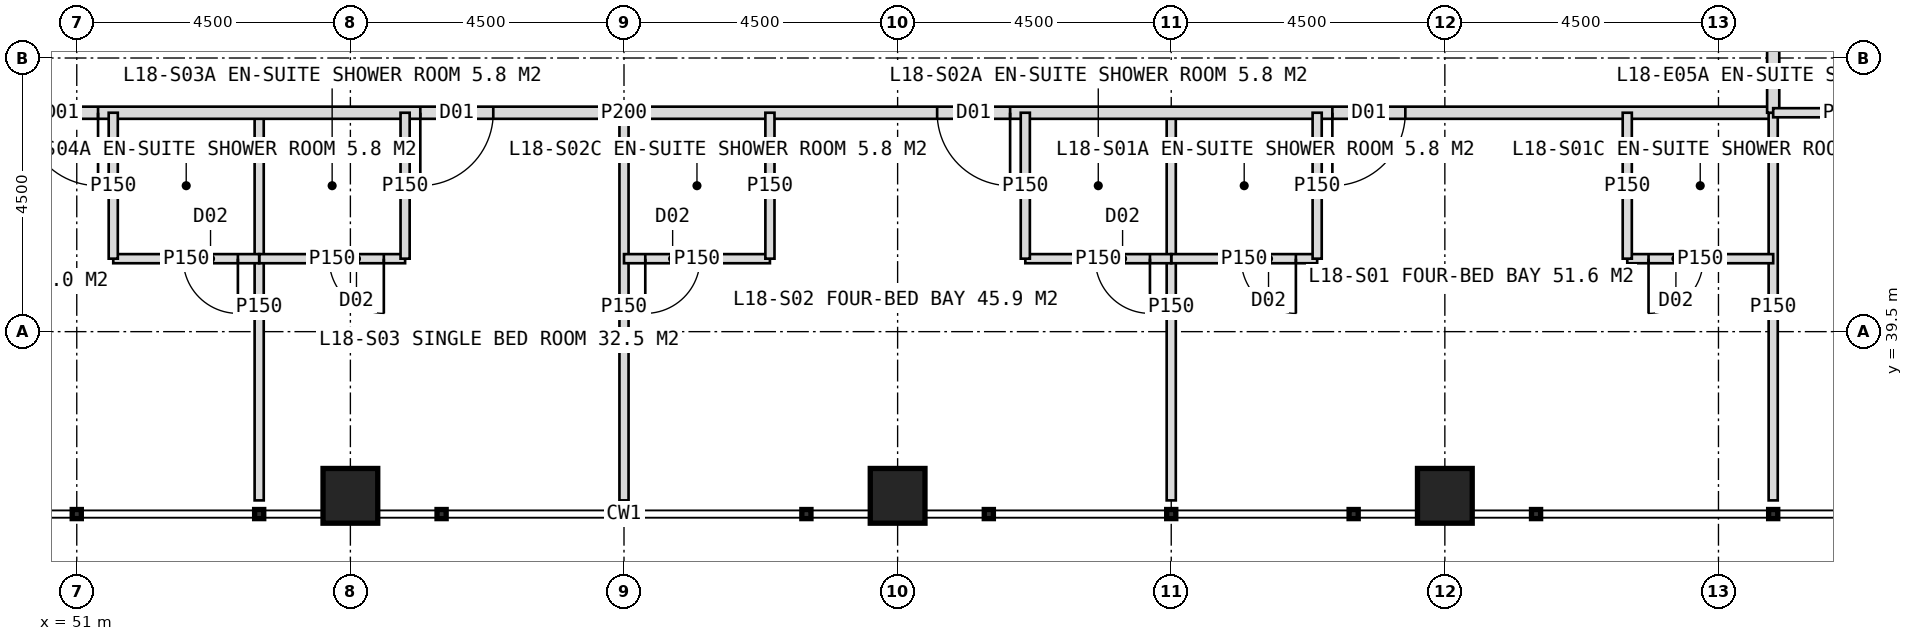
"""IFC4 building model, lengths in metres.
Left out: names, types, materials, properties, quantities, classifications, styles, units other than length and angle.
Written with IfcOpenShell. Run it as: python <this file> out.ifc"""

import sys

from ifc_helpers import new_model, si_unit, direction, frame, frame_2d, origin, origin_2d, place, context, subcontext, project, spatial, rectangle, hollow_rectangle, extrude, element, fill, save


model = new_model("IFC4")
c1 = context("Model", 3, precision=1e-05, world=origin(), true_north=direction((0.0, 1.0)))
c2 = subcontext(c1, "Body", "Model", "MODEL_VIEW")
j1 = project(units=[si_unit("LENGTHUNIT", "METRE"), si_unit("PLANEANGLEUNIT", "RADIAN")], contexts=[c1])
p1 = place(None, origin())
s1 = spatial("IfcSite", under=j1, at=p1, CompositionType="ELEMENT")
p2 = place(p1, origin())
s2 = spatial("IfcBuilding", under=s1, at=p2, CompositionType="ELEMENT")
p3 = place(p2, frame((0.0, 0.0, 79.0)))
s3 = spatial("IfcBuildingStorey", under=s2, at=p3, CompositionType="ELEMENT", Elevation=79.0)
for number, where, z_axis, x_axis in (
    (1, (55.5, 36.8, 0.0), (0.0, 0.0, 1.0), (1.0, 0.0, 0.0)),
    (2, (64.5, 36.8, 0.0), (0.0, 0.0, 1.0), (1.0, 0.0, 0.0)),
    (3, (73.5, 36.8, 0.0), (0.0, 0.0, 1.0), (1.0, 0.0, 0.0)),
):
    element("IfcColumn", number, at=place(p3, frame(where, z_axis=z_axis, x_axis=x_axis)), inside=s3, PredefinedType="COLUMN", context=c2, shape_type="SweptSolid", body=[
        extrude(hollow_rectangle(XDim=0.9, YDim=0.9, WallThickness=0.08, at=origin_2d()), origin(), (0.0, 0.0, 1.0), 4.0),
    ])
p4 = place(p3, frame((69.0, 43.1, 0.0), z_axis=(0.0, 0.0, 1.0), x_axis=(0.0, -1.0, 0.0)))
e4 = element("IfcWall", 4, at=p4, inside=s3, PredefinedType="PARTITIONING", context=c2, shape_type="SweptSolid", body=[
    extrude(rectangle(XDim=6.375, YDim=0.15, at=frame_2d((3.188, 0.0))), origin(), (0.0, 0.0, 1.0), 3.75),
])
p5 = place(p3, frame((60.0, 43.1, 0.0), z_axis=(0.0, 0.0, 1.0), x_axis=(0.0, -1.0, 0.0)))
e5 = element("IfcWall", 5, at=p5, inside=s3, PredefinedType="PARTITIONING", context=c2, shape_type="SweptSolid", body=[
    extrude(rectangle(XDim=6.375, YDim=0.15, at=frame_2d((3.188, 0.0))), origin(), (0.0, 0.0, 1.0), 2.75),
])
p6 = place(p3, frame((54.0, 43.1, 0.0), z_axis=(0.0, 0.0, 1.0), x_axis=(0.0, -1.0, 0.0)))
e6 = element("IfcWall", 6, at=p6, inside=s3, PredefinedType="PARTITIONING", context=c2, shape_type="SweptSolid", body=[
    extrude(rectangle(XDim=6.375, YDim=0.15, at=frame_2d((3.188, 0.0))), origin(), (0.0, 0.0, 1.0), 3.75),
])
p7 = place(p3, frame((78.9, 43.1, 0.0), z_axis=(0.0, 0.0, 1.0), x_axis=(-1.0, 0.0, 0.0)))
e7 = element("IfcWall", 7, at=p7, inside=s3, PredefinedType="PARTITIONING", context=c2, shape_type="SweptSolid", body=[
    extrude(rectangle(XDim=37.8, YDim=0.2, at=frame_2d((18.9, 0.0))), origin(), (0.0, 0.0, 1.0), 3.75),
])
p8 = place(p7, frame((6.05, 0.0, 0.0)))
e8 = element("IfcOpeningElement", 8, at=p8, cuts=e7, PredefinedType="OPENING", context=c2, shape_type="SweptSolid", body=[
    extrude(rectangle(XDim=1.2, YDim=2.2, at=frame_2d((0.6, 1.1))), frame((0.0, 0.11, 0.0), z_axis=(0.0, -1.0, 0.0), x_axis=(1.0, 0.0, 0.0)), (0.0, 0.0, 1.0), 0.22),
])
p9 = place(p7, frame((12.55, 0.0, 0.0)))
e9 = element("IfcOpeningElement", 9, at=p9, cuts=e7, PredefinedType="OPENING", context=c2, shape_type="SweptSolid", body=[
    extrude(rectangle(XDim=1.2, YDim=2.2, at=frame_2d((0.6, 1.1))), frame((0.0, 0.11, 0.0), z_axis=(0.0, -1.0, 0.0), x_axis=(1.0, 0.0, 0.0)), (0.0, 0.0, 1.0), 0.22),
])
p10 = place(p7, frame((21.05, 0.0, 0.0)))
e10 = element("IfcOpeningElement", 10, at=p10, cuts=e7, PredefinedType="OPENING", context=c2, shape_type="SweptSolid", body=[
    extrude(rectangle(XDim=1.2, YDim=2.2, at=frame_2d((0.6, 1.1))), frame((0.0, 0.11, 0.0), z_axis=(0.0, -1.0, 0.0), x_axis=(1.0, 0.0, 0.0)), (0.0, 0.0, 1.0), 0.22),
])
p11 = place(p7, frame((27.55, 0.0, 0.0)))
e11 = element("IfcOpeningElement", 11, at=p11, cuts=e7, PredefinedType="OPENING", context=c2, shape_type="SweptSolid", body=[
    extrude(rectangle(XDim=1.2, YDim=2.2, at=frame_2d((0.6, 1.1))), frame((0.0, 0.11, 0.0), z_axis=(0.0, -1.0, 0.0), x_axis=(1.0, 0.0, 0.0)), (0.0, 0.0, 1.0), 0.22),
])
p12 = place(p3, frame((78.9, 43.1, 0.0), z_axis=(0.0, 0.0, 1.0), x_axis=(0.0, -1.0, 0.0)))
e12 = element("IfcWall", 12, at=p12, inside=s3, PredefinedType="PARTITIONING", context=c2, shape_type="SweptSolid", body=[
    extrude(rectangle(XDim=6.375, YDim=0.15, at=frame_2d((3.188, 0.0))), origin(), (0.0, 0.0, 1.0), 3.75),
])
p13 = place(p3, frame((71.4, 40.7, 0.0), z_axis=(0.0, 0.0, 1.0), x_axis=(-1.0, 0.0, 0.0)))
e13 = element("IfcWall", 13, at=p13, inside=s3, PredefinedType="PARTITIONING", context=c2, shape_type="SweptSolid", body=[
    extrude(rectangle(XDim=2.4, YDim=0.15, at=frame_2d((1.2, 0.0))), origin(), (0.0, 0.0, 1.0), 3.75),
])
p14 = place(p13, frame((0.35, 0.0, 0.0)))
e14 = element("IfcOpeningElement", 14, at=p14, cuts=e13, PredefinedType="OPENING", context=c2, shape_type="SweptSolid", body=[
    extrude(rectangle(XDim=0.9, YDim=2.1, at=frame_2d((0.45, 1.05))), frame((0.0, 0.085, 0.0), z_axis=(0.0, -1.0, 0.0), x_axis=(1.0, 0.0, 0.0)), (0.0, 0.0, 1.0), 0.17),
])
p15 = place(p3, frame((71.4, 43.1, 0.0), z_axis=(0.0, 0.0, 1.0), x_axis=(0.0, -1.0, 0.0)))
e15 = element("IfcWall", 15, at=p15, inside=s3, PredefinedType="PARTITIONING", context=c2, shape_type="SweptSolid", body=[
    extrude(rectangle(XDim=2.4, YDim=0.15, at=frame_2d((1.2, 0.0))), origin(), (0.0, 0.0, 1.0), 3.75),
])
p16 = place(p3, frame((78.9, 40.7, 0.0), z_axis=(0.0, 0.0, 1.0), x_axis=(-1.0, 0.0, 0.0)))
e16 = element("IfcWall", 16, at=p16, inside=s3, PredefinedType="PARTITIONING", context=c2, shape_type="SweptSolid", body=[
    extrude(rectangle(XDim=2.4, YDim=0.15, at=frame_2d((1.2, 0.0))), origin(), (0.0, 0.0, 1.0), 3.75),
])
p17 = place(p16, frame((1.15, 0.0, 0.0)))
e17 = element("IfcOpeningElement", 17, at=p17, cuts=e16, PredefinedType="OPENING", context=c2, shape_type="SweptSolid", body=[
    extrude(rectangle(XDim=0.9, YDim=2.1, at=frame_2d((0.45, 1.05))), frame((0.0, 0.085, 0.0), z_axis=(0.0, -1.0, 0.0), x_axis=(1.0, 0.0, 0.0)), (0.0, 0.0, 1.0), 0.17),
])
p18 = place(p3, frame((76.5, 43.1, 0.0), z_axis=(0.0, 0.0, 1.0), x_axis=(0.0, -1.0, 0.0)))
e18 = element("IfcWall", 18, at=p18, inside=s3, PredefinedType="PARTITIONING", context=c2, shape_type="SweptSolid", body=[
    extrude(rectangle(XDim=2.4, YDim=0.15, at=frame_2d((1.2, 0.0))), origin(), (0.0, 0.0, 1.0), 3.75),
])
p19 = place(p3, frame((69.0, 40.7, 0.0), z_axis=(0.0, 0.0, 1.0), x_axis=(-1.0, 0.0, 0.0)))
e19 = element("IfcWall", 19, at=p19, inside=s3, PredefinedType="PARTITIONING", context=c2, shape_type="SweptSolid", body=[
    extrude(rectangle(XDim=2.4, YDim=0.15, at=frame_2d((1.2, 0.0))), origin(), (0.0, 0.0, 1.0), 3.75),
])
p20 = place(p19, frame((0.35, 0.0, 0.0)))
e20 = element("IfcOpeningElement", 20, at=p20, cuts=e19, PredefinedType="OPENING", context=c2, shape_type="SweptSolid", body=[
    extrude(rectangle(XDim=0.9, YDim=2.1, at=frame_2d((0.45, 1.05))), frame((0.0, 0.085, 0.0), z_axis=(0.0, -1.0, 0.0), x_axis=(1.0, 0.0, 0.0)), (0.0, 0.0, 1.0), 0.17),
])
p21 = place(p3, frame((66.6, 43.1, 0.0), z_axis=(0.0, 0.0, 1.0), x_axis=(0.0, -1.0, 0.0)))
e21 = element("IfcWall", 21, at=p21, inside=s3, PredefinedType="PARTITIONING", context=c2, shape_type="SweptSolid", body=[
    extrude(rectangle(XDim=2.4, YDim=0.15, at=frame_2d((1.2, 0.0))), origin(), (0.0, 0.0, 1.0), 3.75),
])
p22 = place(p3, frame((62.4, 40.7, 0.0), z_axis=(0.0, 0.0, 1.0), x_axis=(-1.0, 0.0, 0.0)))
e22 = element("IfcWall", 22, at=p22, inside=s3, PredefinedType="PARTITIONING", context=c2, shape_type="SweptSolid", body=[
    extrude(rectangle(XDim=2.4, YDim=0.15, at=frame_2d((1.2, 0.0))), origin(), (0.0, 0.0, 1.0), 3.75),
])
p23 = place(p22, frame((1.15, 0.0, 0.0)))
e23 = element("IfcOpeningElement", 23, at=p23, cuts=e22, PredefinedType="OPENING", context=c2, shape_type="SweptSolid", body=[
    extrude(rectangle(XDim=0.9, YDim=2.1, at=frame_2d((0.45, 1.05))), frame((0.0, 0.085, 0.0), z_axis=(0.0, -1.0, 0.0), x_axis=(1.0, 0.0, 0.0)), (0.0, 0.0, 1.0), 0.17),
])
p24 = place(p3, frame((62.4, 43.1, 0.0), z_axis=(0.0, 0.0, 1.0), x_axis=(0.0, -1.0, 0.0)))
e24 = element("IfcWall", 24, at=p24, inside=s3, PredefinedType="PARTITIONING", context=c2, shape_type="SweptSolid", body=[
    extrude(rectangle(XDim=2.4, YDim=0.15, at=frame_2d((1.2, 0.0))), origin(), (0.0, 0.0, 1.0), 3.75),
])
p25 = place(p3, frame((56.4, 40.7, 0.0), z_axis=(0.0, 0.0, 1.0), x_axis=(-1.0, 0.0, 0.0)))
e25 = element("IfcWall", 25, at=p25, inside=s3, PredefinedType="PARTITIONING", context=c2, shape_type="SweptSolid", body=[
    extrude(rectangle(XDim=2.4, YDim=0.15, at=frame_2d((1.2, 0.0))), origin(), (0.0, 0.0, 1.0), 3.75),
])
p26 = place(p25, frame((0.35, 0.0, 0.0)))
e26 = element("IfcOpeningElement", 26, at=p26, cuts=e25, PredefinedType="OPENING", context=c2, shape_type="SweptSolid", body=[
    extrude(rectangle(XDim=0.9, YDim=2.1, at=frame_2d((0.45, 1.05))), frame((0.0, 0.085, 0.0), z_axis=(0.0, -1.0, 0.0), x_axis=(1.0, 0.0, 0.0)), (0.0, 0.0, 1.0), 0.17),
])
p27 = place(p3, frame((56.4, 43.1, 0.0), z_axis=(0.0, 0.0, 1.0), x_axis=(0.0, -1.0, 0.0)))
e27 = element("IfcWall", 27, at=p27, inside=s3, PredefinedType="PARTITIONING", context=c2, shape_type="SweptSolid", body=[
    extrude(rectangle(XDim=2.4, YDim=0.15, at=frame_2d((1.2, 0.0))), origin(), (0.0, 0.0, 1.0), 3.75),
])
p28 = place(p3, frame((54.0, 40.7, 0.0), z_axis=(0.0, 0.0, 1.0), x_axis=(-1.0, 0.0, 0.0)))
e28 = element("IfcWall", 28, at=p28, inside=s3, PredefinedType="PARTITIONING", context=c2, shape_type="SweptSolid", body=[
    extrude(rectangle(XDim=2.4, YDim=0.15, at=frame_2d((1.2, 0.0))), origin(), (0.0, 0.0, 1.0), 3.75),
])
p29 = place(p28, frame((0.35, 0.0, 0.0)))
e29 = element("IfcOpeningElement", 29, at=p29, cuts=e28, PredefinedType="OPENING", context=c2, shape_type="SweptSolid", body=[
    extrude(rectangle(XDim=0.9, YDim=2.1, at=frame_2d((0.45, 1.05))), frame((0.0, 0.085, 0.0), z_axis=(0.0, -1.0, 0.0), x_axis=(1.0, 0.0, 0.0)), (0.0, 0.0, 1.0), 0.17),
])
p30 = place(p3, frame((51.6, 43.1, 0.0), z_axis=(0.0, 0.0, 1.0), x_axis=(0.0, -1.0, 0.0)))
e30 = element("IfcWall", 30, at=p30, inside=s3, PredefinedType="PARTITIONING", context=c2, shape_type="SweptSolid", body=[
    extrude(rectangle(XDim=2.4, YDim=0.15, at=frame_2d((1.2, 0.0))), origin(), (0.0, 0.0, 1.0), 3.75),
])
p31 = place(p3, frame((78.9, 80.9, 0.0), z_axis=(0.0, 0.0, 1.0), x_axis=(0.0, -1.0, 0.0)))
e31 = element("IfcWall", 31, at=p31, inside=s3, PredefinedType="PARTITIONING", context=c2, shape_type="SweptSolid", body=[
    extrude(rectangle(XDim=37.8, YDim=0.2, at=frame_2d((18.9, 0.0))), origin(), (0.0, 0.0, 1.0), 3.75),
])
p32 = place(p31, frame((2.45, 0.0, 0.0)))
e32 = element("IfcOpeningElement", 32, at=p32, cuts=e31, PredefinedType="OPENING", context=c2, shape_type="SweptSolid", body=[
    extrude(rectangle(XDim=1.2, YDim=2.2, at=frame_2d((0.6, 1.1))), frame((0.0, 0.11, 0.0), z_axis=(0.0, -1.0, 0.0), x_axis=(1.0, 0.0, 0.0)), (0.0, 0.0, 1.0), 0.22),
])
p33 = place(p31, frame((9.55, 0.0, 0.0)))
e33 = element("IfcOpeningElement", 33, at=p33, cuts=e31, PredefinedType="OPENING", context=c2, shape_type="SweptSolid", body=[
    extrude(rectangle(XDim=1.2, YDim=2.2, at=frame_2d((0.6, 1.1))), frame((0.0, 0.11, 0.0), z_axis=(0.0, -1.0, 0.0), x_axis=(1.0, 0.0, 0.0)), (0.0, 0.0, 1.0), 0.22),
])
p34 = place(p31, frame((15.05, 0.0, 0.0)))
e34 = element("IfcOpeningElement", 34, at=p34, cuts=e31, PredefinedType="OPENING", context=c2, shape_type="SweptSolid", body=[
    extrude(rectangle(XDim=1.2, YDim=2.2, at=frame_2d((0.6, 1.1))), frame((0.0, 0.11, 0.0), z_axis=(0.0, -1.0, 0.0), x_axis=(1.0, 0.0, 0.0)), (0.0, 0.0, 1.0), 0.22),
])
p35 = place(p31, frame((21.55, 0.0, 0.0)))
e35 = element("IfcOpeningElement", 35, at=p35, cuts=e31, PredefinedType="OPENING", context=c2, shape_type="SweptSolid", body=[
    extrude(rectangle(XDim=1.2, YDim=2.2, at=frame_2d((0.6, 1.1))), frame((0.0, 0.11, 0.0), z_axis=(0.0, -1.0, 0.0), x_axis=(1.0, 0.0, 0.0)), (0.0, 0.0, 1.0), 0.22),
])
p36 = place(p31, frame((33.95, 0.0, 0.0)))
e36 = element("IfcOpeningElement", 36, at=p36, cuts=e31, PredefinedType="OPENING", context=c2, shape_type="SweptSolid", body=[
    extrude(rectangle(XDim=1.2, YDim=2.2, at=frame_2d((0.6, 1.1))), frame((0.0, 0.11, 0.0), z_axis=(0.0, -1.0, 0.0), x_axis=(1.0, 0.0, 0.0)), (0.0, 0.0, 1.0), 0.22),
])
p37 = place(p3, frame((78.9, 43.1, 0.0), z_axis=(0.0, 0.0, 1.0), x_axis=(1.0, 0.0, 0.0)))
e37 = element("IfcWall", 37, at=p37, inside=s3, PredefinedType="PARTITIONING", context=c2, shape_type="SweptSolid", body=[
    extrude(rectangle(XDim=2.4, YDim=0.15, at=frame_2d((1.2, 0.0))), origin(), (0.0, 0.0, 1.0), 3.75),
])
p38 = place(p8, origin())
e38 = element("IfcDoor", 38, at=p38, inside=s3, OperationType="SINGLE_SWING_RIGHT", PredefinedType="DOOR", context=c2, shape_type="SweptSolid", body=[
    extrude(rectangle(XDim=1.2, YDim=2.2, at=frame_2d((0.6, 1.1))), frame((0.0, 0.025, 0.0), z_axis=(0.0, -1.0, 0.0), x_axis=(1.0, 0.0, 0.0)), (0.0, 0.0, 1.0), 0.05),
])
fill(e8, e38)
p39 = place(p14, origin())
e39 = element("IfcDoor", 39, at=p39, inside=s3, OperationType="SINGLE_SWING_LEFT", PredefinedType="DOOR", context=c2, shape_type="SweptSolid", body=[
    extrude(rectangle(XDim=0.9, YDim=2.1, at=frame_2d((0.45, 1.05))), frame((0.0, 0.025, 0.0), z_axis=(0.0, -1.0, 0.0), x_axis=(1.0, 0.0, 0.0)), (0.0, 0.0, 1.0), 0.05),
])
fill(e14, e39)
p40 = place(p17, origin())
e40 = element("IfcDoor", 40, at=p40, inside=s3, OperationType="SINGLE_SWING_RIGHT", PredefinedType="DOOR", context=c2, shape_type="SweptSolid", body=[
    extrude(rectangle(XDim=0.9, YDim=2.1, at=frame_2d((0.45, 1.05))), frame((0.0, 0.025, 0.0), z_axis=(0.0, -1.0, 0.0), x_axis=(1.0, 0.0, 0.0)), (0.0, 0.0, 1.0), 0.05),
])
fill(e17, e40)
p41 = place(p9, origin())
e41 = element("IfcDoor", 41, at=p41, inside=s3, OperationType="SINGLE_SWING_LEFT", PredefinedType="DOOR", context=c2, shape_type="SweptSolid", body=[
    extrude(rectangle(XDim=1.2, YDim=2.2, at=frame_2d((0.6, 1.1))), frame((0.0, 0.025, 0.0), z_axis=(0.0, -1.0, 0.0), x_axis=(1.0, 0.0, 0.0)), (0.0, 0.0, 1.0), 0.05),
])
fill(e9, e41)
p42 = place(p20, origin())
e42 = element("IfcDoor", 42, at=p42, inside=s3, OperationType="SINGLE_SWING_LEFT", PredefinedType="DOOR", context=c2, shape_type="SweptSolid", body=[
    extrude(rectangle(XDim=0.9, YDim=2.1, at=frame_2d((0.45, 1.05))), frame((0.0, 0.025, 0.0), z_axis=(0.0, -1.0, 0.0), x_axis=(1.0, 0.0, 0.0)), (0.0, 0.0, 1.0), 0.05),
])
fill(e20, e42)
p43 = place(p23, origin())
e43 = element("IfcDoor", 43, at=p43, inside=s3, OperationType="SINGLE_SWING_RIGHT", PredefinedType="DOOR", context=c2, shape_type="SweptSolid", body=[
    extrude(rectangle(XDim=0.9, YDim=2.1, at=frame_2d((0.45, 1.05))), frame((0.0, 0.025, 0.0), z_axis=(0.0, -1.0, 0.0), x_axis=(1.0, 0.0, 0.0)), (0.0, 0.0, 1.0), 0.05),
])
fill(e23, e43)
p44 = place(p10, origin())
e44 = element("IfcDoor", 44, at=p44, inside=s3, OperationType="SINGLE_SWING_RIGHT", PredefinedType="DOOR", context=c2, shape_type="SweptSolid", body=[
    extrude(rectangle(XDim=1.2, YDim=2.2, at=frame_2d((0.6, 1.1))), frame((0.0, 0.025, 0.0), z_axis=(0.0, -1.0, 0.0), x_axis=(1.0, 0.0, 0.0)), (0.0, 0.0, 1.0), 0.05),
])
fill(e10, e44)
p45 = place(p26, origin())
e45 = element("IfcDoor", 45, at=p45, inside=s3, OperationType="SINGLE_SWING_LEFT", PredefinedType="DOOR", context=c2, shape_type="SweptSolid", body=[
    extrude(rectangle(XDim=0.9, YDim=2.1, at=frame_2d((0.45, 1.05))), frame((0.0, 0.025, 0.0), z_axis=(0.0, -1.0, 0.0), x_axis=(1.0, 0.0, 0.0)), (0.0, 0.0, 1.0), 0.05),
])
fill(e26, e45)
p46 = place(p11, origin())
e46 = element("IfcDoor", 46, at=p46, inside=s3, OperationType="SINGLE_SWING_LEFT", PredefinedType="DOOR", context=c2, shape_type="SweptSolid", body=[
    extrude(rectangle(XDim=1.2, YDim=2.2, at=frame_2d((0.6, 1.1))), frame((0.0, 0.025, 0.0), z_axis=(0.0, -1.0, 0.0), x_axis=(1.0, 0.0, 0.0)), (0.0, 0.0, 1.0), 0.05),
])
fill(e11, e46)
p47 = place(p29, origin())
e47 = element("IfcDoor", 47, at=p47, inside=s3, OperationType="SINGLE_SWING_LEFT", PredefinedType="DOOR", context=c2, shape_type="SweptSolid", body=[
    extrude(rectangle(XDim=0.9, YDim=2.1, at=frame_2d((0.45, 1.05))), frame((0.0, 0.025, 0.0), z_axis=(0.0, -1.0, 0.0), x_axis=(1.0, 0.0, 0.0)), (0.0, 0.0, 1.0), 0.05),
])
fill(e29, e47)
save(model, sys.argv[1])
